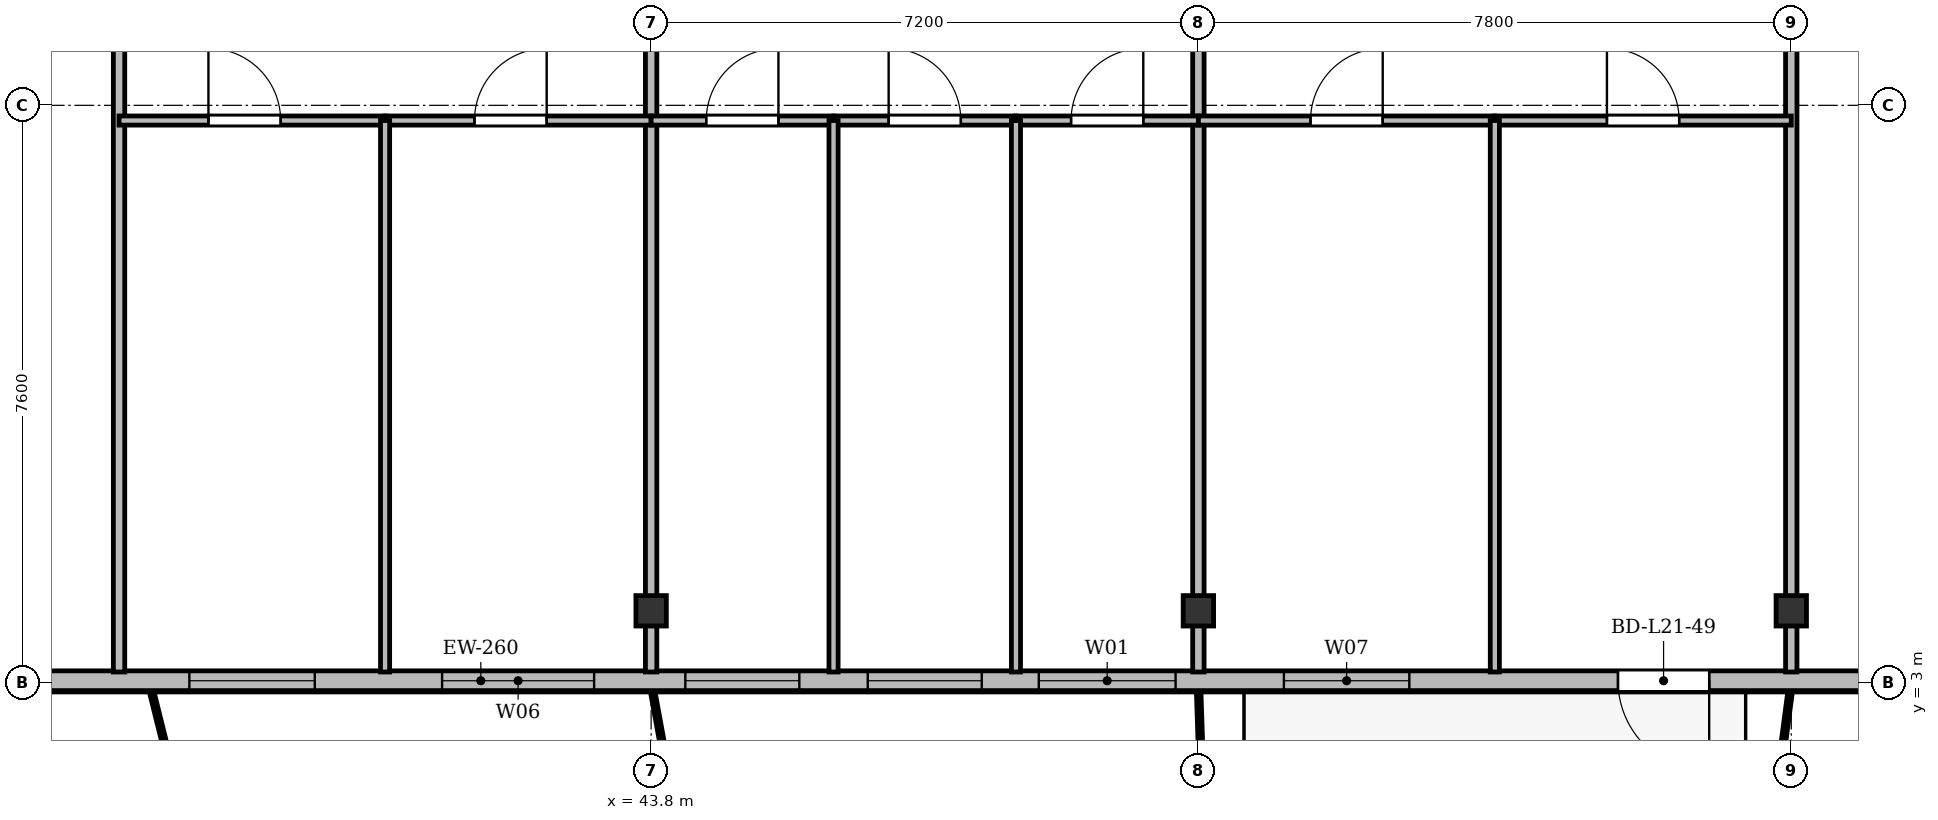
"""IFC4 building model, lengths in metres.
Left out: names, types, materials, properties, quantities, classifications, styles, units other than length and angle.
Written with IfcOpenShell. Run it as: python <this file> out.ifc"""

import sys

from ifc_helpers import new_model, si_unit, direction, frame, frame_2d, origin, origin_2d, place, context, subcontext, project, spatial, rectangle, i_section, extrude, source, transform, mapped, element, fill, save


model = new_model("IFC4")
c1 = context("Model", 3, precision=1e-05, world=origin(), true_north=direction((0.0, 1.0)))
c2 = subcontext(c1, "Body", "Model", "MODEL_VIEW")
j1 = project(units=[si_unit("LENGTHUNIT", "METRE"), si_unit("PLANEANGLEUNIT", "RADIAN")], contexts=[c1])
p1 = place(None, origin())
s1 = spatial("IfcSite", under=j1, at=p1, CompositionType="ELEMENT")
p2 = place(p1, origin())
s2 = spatial("IfcBuilding", under=s1, at=p2, CompositionType="ELEMENT")
p3 = place(p2, frame((0.0, 0.0, 85.3)))
s3 = spatial("IfcBuildingStorey", under=s2, at=p3, CompositionType="ELEMENT", Elevation=85.3)
m1 = source(origin(), c2, "Body", "SweptSolid", [
    extrude(i_section(OverallWidth=0.4, OverallDepth=0.4, WebThickness=0.022, FlangeThickness=0.035, at=origin_2d()), origin(), (0.0, 0.0, 1.0), 3.6),
])
for number, where, z_axis, x_axis in (
    (1, (43.8, 3.95, 0.0), (0.0, 0.0, 1.0), (1.0, 0.0, 0.0)),
    (2, (51.0, 3.95, 0.0), (0.0, 0.0, 1.0), (1.0, 0.0, 0.0)),
    (3, (58.8, 3.95, 0.0), (0.0, 0.0, 1.0), (1.0, 0.0, 0.0)),
):
    element("IfcColumn", number, at=place(p3, frame(where, z_axis=z_axis, x_axis=x_axis)), inside=s3, PredefinedType="COLUMN", context=c2, shape_type="MappedRepresentation", body=[
        mapped(m1, transform((0.0, 0.0, 0.0), x_axis=(1.0, 0.0, 0.0), y_axis=(0.0, 1.0, 0.0), z_axis=(0.0, 0.0, 1.0), scale=1.0)),
    ])
p4 = place(p3, frame((66.9, 3.03, 0.0), z_axis=(0.0, 0.0, 1.0), x_axis=(-1.0, 0.0, 0.0)))
e4 = element("IfcWall", 4, at=p4, inside=s3, PredefinedType="SOLIDWALL", context=c2, shape_type="SweptSolid", body=[
    extrude(rectangle(XDim=59.4, YDim=0.26, at=frame_2d((29.7, 0.0))), origin(), (0.0, 0.0, 1.0), 3.34),
])
p5 = place(p4, frame((0.595, 0.0, 0.9)))
e5 = element("IfcOpeningElement", 5, at=p5, cuts=e4, PredefinedType="OPENING", context=c2, shape_type="SweptSolid", body=[
    extrude(rectangle(XDim=2.2, YDim=1.8, at=frame_2d((1.1, 0.9))), frame((0.0, 0.14, 0.0), z_axis=(0.0, -1.0, 0.0), x_axis=(1.0, 0.0, 0.0)), (0.0, 0.0, 1.0), 0.28),
])
p6 = place(p4, frame((4.95, 0.0, 0.9)))
e6 = element("IfcOpeningElement", 6, at=p6, cuts=e4, PredefinedType="OPENING", context=c2, shape_type="SweptSolid", body=[
    extrude(rectangle(XDim=1.5, YDim=1.75, at=frame_2d((0.75, 0.875))), frame((0.0, 0.14, 0.0), z_axis=(0.0, -1.0, 0.0), x_axis=(1.0, 0.0, 0.0)), (0.0, 0.0, 1.0), 0.28),
])
p7 = place(p4, frame((9.18, 0.0, 0.0)))
e7 = element("IfcOpeningElement", 7, at=p7, cuts=e4, PredefinedType="OPENING", context=c2, shape_type="SweptSolid", body=[
    extrude(rectangle(XDim=1.2, YDim=2.2, at=frame_2d((0.6, 1.1))), frame((0.0, 0.14, 0.0), z_axis=(0.0, -1.0, 0.0), x_axis=(1.0, 0.0, 0.0)), (0.0, 0.0, 1.0), 0.28),
])
p8 = place(p4, frame((13.125, 0.0, 0.9)))
e8 = element("IfcOpeningElement", 8, at=p8, cuts=e4, PredefinedType="OPENING", context=c2, shape_type="SweptSolid", body=[
    extrude(rectangle(XDim=1.65, YDim=1.85, at=frame_2d((0.825, 0.925))), frame((0.0, 0.14, 0.0), z_axis=(0.0, -1.0, 0.0), x_axis=(1.0, 0.0, 0.0)), (0.0, 0.0, 1.0), 0.28),
])
p9 = place(p4, frame((16.2, 0.0, 0.9)))
e9 = element("IfcOpeningElement", 9, at=p9, cuts=e4, PredefinedType="OPENING", context=c2, shape_type="SweptSolid", body=[
    extrude(rectangle(XDim=1.8, YDim=1.8, at=frame_2d((0.9, 0.9))), frame((0.0, 0.14, 0.0), z_axis=(0.0, -1.0, 0.0), x_axis=(1.0, 0.0, 0.0)), (0.0, 0.0, 1.0), 0.28),
])
p10 = place(p4, frame((18.75, 0.0, 0.9)))
e10 = element("IfcOpeningElement", 10, at=p10, cuts=e4, PredefinedType="OPENING", context=c2, shape_type="SweptSolid", body=[
    extrude(rectangle(XDim=1.5, YDim=1.75, at=frame_2d((0.75, 0.875))), frame((0.0, 0.14, 0.0), z_axis=(0.0, -1.0, 0.0), x_axis=(1.0, 0.0, 0.0)), (0.0, 0.0, 1.0), 0.28),
])
p11 = place(p4, frame((21.15, 0.0, 0.9)))
e11 = element("IfcOpeningElement", 11, at=p11, cuts=e4, PredefinedType="OPENING", context=c2, shape_type="SweptSolid", body=[
    extrude(rectangle(XDim=1.5, YDim=1.75, at=frame_2d((0.75, 0.875))), frame((0.0, 0.14, 0.0), z_axis=(0.0, -1.0, 0.0), x_axis=(1.0, 0.0, 0.0)), (0.0, 0.0, 1.0), 0.28),
])
p12 = place(p4, frame((23.85, 0.0, 0.9)))
e12 = element("IfcOpeningElement", 12, at=p12, cuts=e4, PredefinedType="OPENING", context=c2, shape_type="SweptSolid", body=[
    extrude(rectangle(XDim=2.0, YDim=1.95, at=frame_2d((1.0, 0.975))), frame((0.0, 0.14, 0.0), z_axis=(0.0, -1.0, 0.0), x_axis=(1.0, 0.0, 0.0)), (0.0, 0.0, 1.0), 0.28),
])
p13 = place(p4, frame((27.525, 0.0, 0.9)))
e13 = element("IfcOpeningElement", 13, at=p13, cuts=e4, PredefinedType="OPENING", context=c2, shape_type="SweptSolid", body=[
    extrude(rectangle(XDim=1.65, YDim=1.85, at=frame_2d((0.825, 0.925))), frame((0.0, 0.14, 0.0), z_axis=(0.0, -1.0, 0.0), x_axis=(1.0, 0.0, 0.0)), (0.0, 0.0, 1.0), 0.28),
])
p14 = place(p4, frame((32.3, 0.0, 0.9)))
e14 = element("IfcOpeningElement", 14, at=p14, cuts=e4, PredefinedType="OPENING", context=c2, shape_type="SweptSolid", body=[
    extrude(rectangle(XDim=1.8, YDim=1.8, at=frame_2d((0.9, 0.9))), frame((0.0, 0.14, 0.0), z_axis=(0.0, -1.0, 0.0), x_axis=(1.0, 0.0, 0.0)), (0.0, 0.0, 1.0), 0.28),
])
p15 = place(p4, frame((40.301, 0.0, 0.0)))
e15 = element("IfcOpeningElement", 15, at=p15, cuts=e4, PredefinedType="OPENING", context=c2, shape_type="SweptSolid", body=[
    extrude(rectangle(XDim=1.2, YDim=2.2, at=frame_2d((0.6, 1.1))), frame((0.0, 0.14, 0.0), z_axis=(0.0, -1.0, 0.0), x_axis=(1.0, 0.0, 0.0)), (0.0, 0.0, 1.0), 0.28),
])
p16 = place(p4, frame((46.65, 0.0, 0.9)))
e16 = element("IfcOpeningElement", 16, at=p16, cuts=e4, PredefinedType="OPENING", context=c2, shape_type="SweptSolid", body=[
    extrude(rectangle(XDim=1.5, YDim=1.75, at=frame_2d((0.75, 0.875))), frame((0.0, 0.14, 0.0), z_axis=(0.0, -1.0, 0.0), x_axis=(1.0, 0.0, 0.0)), (0.0, 0.0, 1.0), 0.28),
])
p17 = place(p4, frame((54.558, 0.0, 0.0)))
e17 = element("IfcOpeningElement", 17, at=p17, cuts=e4, PredefinedType="OPENING", context=c2, shape_type="SweptSolid", body=[
    extrude(rectangle(XDim=1.2, YDim=2.2, at=frame_2d((0.6, 1.1))), frame((0.0, 0.14, 0.0), z_axis=(0.0, -1.0, 0.0), x_axis=(1.0, 0.0, 0.0)), (0.0, 0.0, 1.0), 0.28),
])
p18 = place(p4, frame((56.98, 0.0, 0.9)))
e18 = element("IfcOpeningElement", 18, at=p18, cuts=e4, PredefinedType="OPENING", context=c2, shape_type="SweptSolid", body=[
    extrude(rectangle(XDim=1.65, YDim=1.85, at=frame_2d((0.825, 0.925))), frame((0.0, 0.14, 0.0), z_axis=(0.0, -1.0, 0.0), x_axis=(1.0, 0.0, 0.0)), (0.0, 0.0, 1.0), 0.28),
])
p19 = place(p3, frame((36.8, 3.145, 0.0), z_axis=(0.0, 0.0, 1.0), x_axis=(0.0, 1.0, 0.0)))
e19 = element("IfcWall", 19, at=p19, inside=s3, PredefinedType="PARTITIONING", context=c2, shape_type="SweptSolid", body=[
    extrude(rectangle(XDim=24.455, YDim=0.15, at=frame_2d((12.228, 0.0))), origin(), (0.0, 0.0, 1.0), 2.752),
])
for number, where, z_axis, x_axis in (
    (20, (43.8, 3.145, 0.0), (0.0, 0.0, 1.0), (0.0, 1.0, 0.0)),
    (21, (51.0, 3.145, 0.0), (0.0, 0.0, 1.0), (0.0, 1.0, 0.0)),
    (22, (58.8, 3.145, 0.0), (0.0, 0.0, 1.0), (0.0, 1.0, 0.0)),
):
    element("IfcWall", number, at=place(p3, frame(where, z_axis=z_axis, x_axis=x_axis)), inside=s3, PredefinedType="PARTITIONING", context=c2, shape_type="SweptSolid", body=[
        extrude(rectangle(XDim=24.455, YDim=0.15, at=frame_2d((12.228, 0.0))), origin(), (0.0, 0.0, 1.0), 2.84),
    ])
p20 = place(p3, frame((36.8, 10.4, 0.0), z_axis=(0.0, 0.0, 1.0), x_axis=(1.0, 0.0, 0.0)))
e23 = element("IfcWall", 23, at=p20, inside=s3, PredefinedType="PARTITIONING", context=c2, shape_type="SweptSolid", body=[
    extrude(rectangle(XDim=3.5, YDim=0.12, at=frame_2d((1.75, 0.0))), origin(), (0.0, 0.0, 1.0), 3.34),
])
p21 = place(p20, frame((1.176, 0.0, 0.0)))
e24 = element("IfcOpeningElement", 24, at=p21, cuts=e23, PredefinedType="OPENING", context=c2, shape_type="SweptSolid", body=[
    extrude(rectangle(XDim=0.95, YDim=2.15, at=frame_2d((0.475, 1.075))), frame((0.0, 0.07, 0.0), z_axis=(0.0, -1.0, 0.0), x_axis=(1.0, 0.0, 0.0)), (0.0, 0.0, 1.0), 0.14),
])
p22 = place(p3, frame((40.3, 10.4, 0.0), z_axis=(0.0, 0.0, 1.0), x_axis=(1.0, 0.0, 0.0)))
e25 = element("IfcWall", 25, at=p22, inside=s3, PredefinedType="PARTITIONING", context=c2, shape_type="SweptSolid", body=[
    extrude(rectangle(XDim=3.5, YDim=0.12, at=frame_2d((1.75, 0.0))), origin(), (0.0, 0.0, 1.0), 2.84),
])
p23 = place(p22, frame((1.176, 0.0, 0.0)))
e26 = element("IfcOpeningElement", 26, at=p23, cuts=e25, PredefinedType="OPENING", context=c2, shape_type="SweptSolid", body=[
    extrude(rectangle(XDim=0.95, YDim=2.15, at=frame_2d((0.475, 1.075))), frame((0.0, 0.07, 0.0), z_axis=(0.0, -1.0, 0.0), x_axis=(1.0, 0.0, 0.0)), (0.0, 0.0, 1.0), 0.14),
])
p24 = place(p3, frame((40.3, 3.145, 0.0), z_axis=(0.0, 0.0, 1.0), x_axis=(0.0, 1.0, 0.0)))
e27 = element("IfcWall", 27, at=p24, inside=s3, PredefinedType="PARTITIONING", context=c2, shape_type="SweptSolid", body=[
    extrude(rectangle(XDim=7.255, YDim=0.12, at=frame_2d((3.627, 0.0))), origin(), (0.0, 0.0, 1.0), 2.752),
])
p25 = place(p3, frame((43.8, 10.4, 0.0), z_axis=(0.0, 0.0, 1.0), x_axis=(1.0, 0.0, 0.0)))
e28 = element("IfcWall", 28, at=p25, inside=s3, PredefinedType="PARTITIONING", context=c2, shape_type="SweptSolid", body=[
    extrude(rectangle(XDim=2.4, YDim=0.12, at=frame_2d((1.2, 0.0))), origin(), (0.0, 0.0, 1.0), 2.84),
])
p26 = place(p25, frame((0.725, 0.0, 0.0)))
e29 = element("IfcOpeningElement", 29, at=p26, cuts=e28, PredefinedType="OPENING", context=c2, shape_type="SweptSolid", body=[
    extrude(rectangle(XDim=0.95, YDim=2.15, at=frame_2d((0.475, 1.075))), frame((0.0, 0.07, 0.0), z_axis=(0.0, -1.0, 0.0), x_axis=(1.0, 0.0, 0.0)), (0.0, 0.0, 1.0), 0.14),
])
p27 = place(p3, frame((46.2, 10.4, 0.0), z_axis=(0.0, 0.0, 1.0), x_axis=(1.0, 0.0, 0.0)))
e30 = element("IfcWall", 30, at=p27, inside=s3, PredefinedType="PARTITIONING", context=c2, shape_type="SweptSolid", body=[
    extrude(rectangle(XDim=2.4, YDim=0.12, at=frame_2d((1.2, 0.0))), origin(), (0.0, 0.0, 1.0), 3.34),
])
p28 = place(p27, frame((0.725, 0.0, 0.0)))
e31 = element("IfcOpeningElement", 31, at=p28, cuts=e30, PredefinedType="OPENING", context=c2, shape_type="SweptSolid", body=[
    extrude(rectangle(XDim=0.95, YDim=2.15, at=frame_2d((0.475, 1.075))), frame((0.0, 0.07, 0.0), z_axis=(0.0, -1.0, 0.0), x_axis=(1.0, 0.0, 0.0)), (0.0, 0.0, 1.0), 0.14),
])
p29 = place(p3, frame((46.2, 3.145, 0.0), z_axis=(0.0, 0.0, 1.0), x_axis=(0.0, 1.0, 0.0)))
e32 = element("IfcWall", 32, at=p29, inside=s3, PredefinedType="PARTITIONING", context=c2, shape_type="SweptSolid", body=[
    extrude(rectangle(XDim=7.255, YDim=0.12, at=frame_2d((3.627, 0.0))), origin(), (0.0, 0.0, 1.0), 2.752),
])
p30 = place(p3, frame((48.6, 10.4, 0.0), z_axis=(0.0, 0.0, 1.0), x_axis=(1.0, 0.0, 0.0)))
e33 = element("IfcWall", 33, at=p30, inside=s3, PredefinedType="PARTITIONING", context=c2, shape_type="SweptSolid", body=[
    extrude(rectangle(XDim=2.4, YDim=0.12, at=frame_2d((1.2, 0.0))), origin(), (0.0, 0.0, 1.0), 2.84),
])
p31 = place(p30, frame((0.725, 0.0, 0.0)))
e34 = element("IfcOpeningElement", 34, at=p31, cuts=e33, PredefinedType="OPENING", context=c2, shape_type="SweptSolid", body=[
    extrude(rectangle(XDim=0.95, YDim=2.15, at=frame_2d((0.475, 1.075))), frame((0.0, 0.07, 0.0), z_axis=(0.0, -1.0, 0.0), x_axis=(1.0, 0.0, 0.0)), (0.0, 0.0, 1.0), 0.14),
])
p32 = place(p3, frame((48.6, 3.145, 0.0), z_axis=(0.0, 0.0, 1.0), x_axis=(0.0, 1.0, 0.0)))
e35 = element("IfcWall", 35, at=p32, inside=s3, PredefinedType="PARTITIONING", context=c2, shape_type="SweptSolid", body=[
    extrude(rectangle(XDim=7.255, YDim=0.12, at=frame_2d((3.627, 0.0))), origin(), (0.0, 0.0, 1.0), 2.752),
])
p33 = place(p3, frame((51.0, 10.4, 0.0), z_axis=(0.0, 0.0, 1.0), x_axis=(1.0, 0.0, 0.0)))
e36 = element("IfcWall", 36, at=p33, inside=s3, PredefinedType="PARTITIONING", context=c2, shape_type="SweptSolid", body=[
    extrude(rectangle(XDim=3.9, YDim=0.12, at=frame_2d((1.95, 0.0))), origin(), (0.0, 0.0, 1.0), 2.84),
])
p34 = place(p33, frame((1.475, 0.0, 0.0)))
e37 = element("IfcOpeningElement", 37, at=p34, cuts=e36, PredefinedType="OPENING", context=c2, shape_type="SweptSolid", body=[
    extrude(rectangle(XDim=0.95, YDim=2.15, at=frame_2d((0.475, 1.075))), frame((0.0, 0.07, 0.0), z_axis=(0.0, -1.0, 0.0), x_axis=(1.0, 0.0, 0.0)), (0.0, 0.0, 1.0), 0.14),
])
p35 = place(p3, frame((54.9, 10.4, 0.0), z_axis=(0.0, 0.0, 1.0), x_axis=(1.0, 0.0, 0.0)))
e38 = element("IfcWall", 38, at=p35, inside=s3, PredefinedType="PARTITIONING", context=c2, shape_type="SweptSolid", body=[
    extrude(rectangle(XDim=3.9, YDim=0.12, at=frame_2d((1.95, 0.0))), origin(), (0.0, 0.0, 1.0), 2.84),
])
p36 = place(p35, frame((1.475, 0.0, 0.0)))
e39 = element("IfcOpeningElement", 39, at=p36, cuts=e38, PredefinedType="OPENING", context=c2, shape_type="SweptSolid", body=[
    extrude(rectangle(XDim=0.95, YDim=2.15, at=frame_2d((0.475, 1.075))), frame((0.0, 0.07, 0.0), z_axis=(0.0, -1.0, 0.0), x_axis=(1.0, 0.0, 0.0)), (0.0, 0.0, 1.0), 0.14),
])
p37 = place(p3, frame((54.9, 3.145, 0.0), z_axis=(0.0, 0.0, 1.0), x_axis=(0.0, 1.0, 0.0)))
e40 = element("IfcWall", 40, at=p37, inside=s3, PredefinedType="PARTITIONING", context=c2, shape_type="SweptSolid", body=[
    extrude(rectangle(XDim=7.255, YDim=0.12, at=frame_2d((3.627, 0.0))), origin(), (0.0, 0.0, 1.0), 2.752),
])
m2 = source(origin(), c2, "Body", "SweptSolid", [
    extrude(rectangle(XDim=1.2, YDim=2.2, at=frame_2d((0.6, 1.1))), frame((0.0, 0.025, 0.0), z_axis=(0.0, -1.0, 0.0), x_axis=(1.0, 0.0, 0.0)), (0.0, 0.0, 1.0), 0.05),
])
p38 = place(p7, origin())
e41 = element("IfcDoor", 41, at=p38, inside=s3, OperationType="SINGLE_SWING_LEFT", PredefinedType="DOOR", context=c2, shape_type="MappedRepresentation", body=[
    mapped(m2, transform((0.0, 0.0, 0.0), x_axis=(1.0, 0.0, 0.0), y_axis=(0.0, 1.0, 0.0), z_axis=(0.0, 0.0, 1.0), scale=1.0)),
])
fill(e7, e41)
m3 = source(origin(), c2, "Body", "SweptSolid", [
    extrude(rectangle(XDim=1.65, YDim=1.85, at=frame_2d((0.825, 0.925))), frame((0.0, 0.03, 0.0), z_axis=(0.0, -1.0, 0.0), x_axis=(1.0, 0.0, 0.0)), (0.0, 0.0, 1.0), 0.06),
])
p39 = place(p8, origin())
e42 = element("IfcWindow", 42, at=p39, inside=s3, PartitioningType="SINGLE_PANEL", PredefinedType="WINDOW", context=c2, shape_type="MappedRepresentation", body=[
    mapped(m3, transform((0.0, 0.0, 0.0), x_axis=(1.0, 0.0, 0.0), y_axis=(0.0, 1.0, 0.0), z_axis=(0.0, 0.0, 1.0), scale=1.0)),
])
fill(e8, e42)
m4 = source(origin(), c2, "Body", "SweptSolid", [
    extrude(rectangle(XDim=1.8, YDim=1.8, at=frame_2d((0.9, 0.9))), frame((0.0, 0.03, 0.0), z_axis=(0.0, -1.0, 0.0), x_axis=(1.0, 0.0, 0.0)), (0.0, 0.0, 1.0), 0.06),
])
p40 = place(p9, origin())
e43 = element("IfcWindow", 43, at=p40, inside=s3, PartitioningType="SINGLE_PANEL", PredefinedType="WINDOW", context=c2, shape_type="MappedRepresentation", body=[
    mapped(m4, transform((0.0, 0.0, 0.0), x_axis=(1.0, 0.0, 0.0), y_axis=(0.0, 1.0, 0.0), z_axis=(0.0, 0.0, 1.0), scale=1.0)),
])
fill(e9, e43)
m5 = source(origin(), c2, "Body", "SweptSolid", [
    extrude(rectangle(XDim=1.5, YDim=1.75, at=frame_2d((0.75, 0.875))), frame((0.0, 0.03, 0.0), z_axis=(0.0, -1.0, 0.0), x_axis=(1.0, 0.0, 0.0)), (0.0, 0.0, 1.0), 0.06),
])
p41 = place(p10, origin())
e44 = element("IfcWindow", 44, at=p41, inside=s3, PartitioningType="SINGLE_PANEL", PredefinedType="WINDOW", context=c2, shape_type="MappedRepresentation", body=[
    mapped(m5, transform((0.0, 0.0, 0.0), x_axis=(1.0, 0.0, 0.0), y_axis=(0.0, 1.0, 0.0), z_axis=(0.0, 0.0, 1.0), scale=1.0)),
])
fill(e10, e44)
p42 = place(p11, origin())
e45 = element("IfcWindow", 45, at=p42, inside=s3, PartitioningType="SINGLE_PANEL", PredefinedType="WINDOW", context=c2, shape_type="MappedRepresentation", body=[
    mapped(m5, transform((0.0, 0.0, 0.0), x_axis=(1.0, 0.0, 0.0), y_axis=(0.0, 1.0, 0.0), z_axis=(0.0, 0.0, 1.0), scale=1.0)),
])
fill(e11, e45)
m6 = source(origin(), c2, "Body", "SweptSolid", [
    extrude(rectangle(XDim=2.0, YDim=1.95, at=frame_2d((1.0, 0.975))), frame((0.0, 0.03, 0.0), z_axis=(0.0, -1.0, 0.0), x_axis=(1.0, 0.0, 0.0)), (0.0, 0.0, 1.0), 0.06),
])
p43 = place(p12, origin())
e46 = element("IfcWindow", 46, at=p43, inside=s3, PartitioningType="SINGLE_PANEL", PredefinedType="WINDOW", context=c2, shape_type="MappedRepresentation", body=[
    mapped(m6, transform((0.0, 0.0, 0.0), x_axis=(1.0, 0.0, 0.0), y_axis=(0.0, 1.0, 0.0), z_axis=(0.0, 0.0, 1.0), scale=1.0)),
])
fill(e12, e46)
p44 = place(p13, origin())
e47 = element("IfcWindow", 47, at=p44, inside=s3, PartitioningType="SINGLE_PANEL", PredefinedType="WINDOW", context=c2, shape_type="MappedRepresentation", body=[
    mapped(m3, transform((0.0, 0.0, 0.0), x_axis=(1.0, 0.0, 0.0), y_axis=(0.0, 1.0, 0.0), z_axis=(0.0, 0.0, 1.0), scale=1.0)),
])
fill(e13, e47)
m7 = source(origin(), c2, "Body", "SweptSolid", [
    extrude(rectangle(XDim=0.95, YDim=2.15, at=frame_2d((0.475, 1.075))), frame((0.0, 0.025, 0.0), z_axis=(0.0, -1.0, 0.0), x_axis=(1.0, 0.0, 0.0)), (0.0, 0.0, 1.0), 0.05),
])
p45 = place(p21, origin())
e48 = element("IfcDoor", 48, at=p45, inside=s3, OperationType="SINGLE_SWING_LEFT", PredefinedType="DOOR", context=c2, shape_type="MappedRepresentation", body=[
    mapped(m7, transform((0.0, 0.0, 0.0), x_axis=(1.0, 0.0, 0.0), y_axis=(0.0, 1.0, 0.0), z_axis=(0.0, 0.0, 1.0), scale=1.0)),
])
fill(e24, e48)
p46 = place(p23, origin())
e49 = element("IfcDoor", 49, at=p46, inside=s3, OperationType="SINGLE_SWING_RIGHT", PredefinedType="DOOR", context=c2, shape_type="MappedRepresentation", body=[
    mapped(m7, transform((0.0, 0.0, 0.0), x_axis=(1.0, 0.0, 0.0), y_axis=(0.0, 1.0, 0.0), z_axis=(0.0, 0.0, 1.0), scale=1.0)),
])
fill(e26, e49)
p47 = place(p26, origin())
e50 = element("IfcDoor", 50, at=p47, inside=s3, OperationType="SINGLE_SWING_RIGHT", PredefinedType="DOOR", context=c2, shape_type="MappedRepresentation", body=[
    mapped(m7, transform((0.0, 0.0, 0.0), x_axis=(1.0, 0.0, 0.0), y_axis=(0.0, 1.0, 0.0), z_axis=(0.0, 0.0, 1.0), scale=1.0)),
])
fill(e29, e50)
p48 = place(p28, origin())
e51 = element("IfcDoor", 51, at=p48, inside=s3, OperationType="SINGLE_SWING_LEFT", PredefinedType="DOOR", context=c2, shape_type="MappedRepresentation", body=[
    mapped(m7, transform((0.0, 0.0, 0.0), x_axis=(1.0, 0.0, 0.0), y_axis=(0.0, 1.0, 0.0), z_axis=(0.0, 0.0, 1.0), scale=1.0)),
])
fill(e31, e51)
p49 = place(p31, origin())
e52 = element("IfcDoor", 52, at=p49, inside=s3, OperationType="SINGLE_SWING_RIGHT", PredefinedType="DOOR", context=c2, shape_type="MappedRepresentation", body=[
    mapped(m7, transform((0.0, 0.0, 0.0), x_axis=(1.0, 0.0, 0.0), y_axis=(0.0, 1.0, 0.0), z_axis=(0.0, 0.0, 1.0), scale=1.0)),
])
fill(e34, e52)
p50 = place(p34, origin())
e53 = element("IfcDoor", 53, at=p50, inside=s3, OperationType="SINGLE_SWING_RIGHT", PredefinedType="DOOR", context=c2, shape_type="MappedRepresentation", body=[
    mapped(m7, transform((0.0, 0.0, 0.0), x_axis=(1.0, 0.0, 0.0), y_axis=(0.0, 1.0, 0.0), z_axis=(0.0, 0.0, 1.0), scale=1.0)),
])
fill(e37, e53)
p51 = place(p36, origin())
e54 = element("IfcDoor", 54, at=p51, inside=s3, OperationType="SINGLE_SWING_LEFT", PredefinedType="DOOR", context=c2, shape_type="MappedRepresentation", body=[
    mapped(m7, transform((0.0, 0.0, 0.0), x_axis=(1.0, 0.0, 0.0), y_axis=(0.0, 1.0, 0.0), z_axis=(0.0, 0.0, 1.0), scale=1.0)),
])
fill(e39, e54)
save(model, sys.argv[1])
